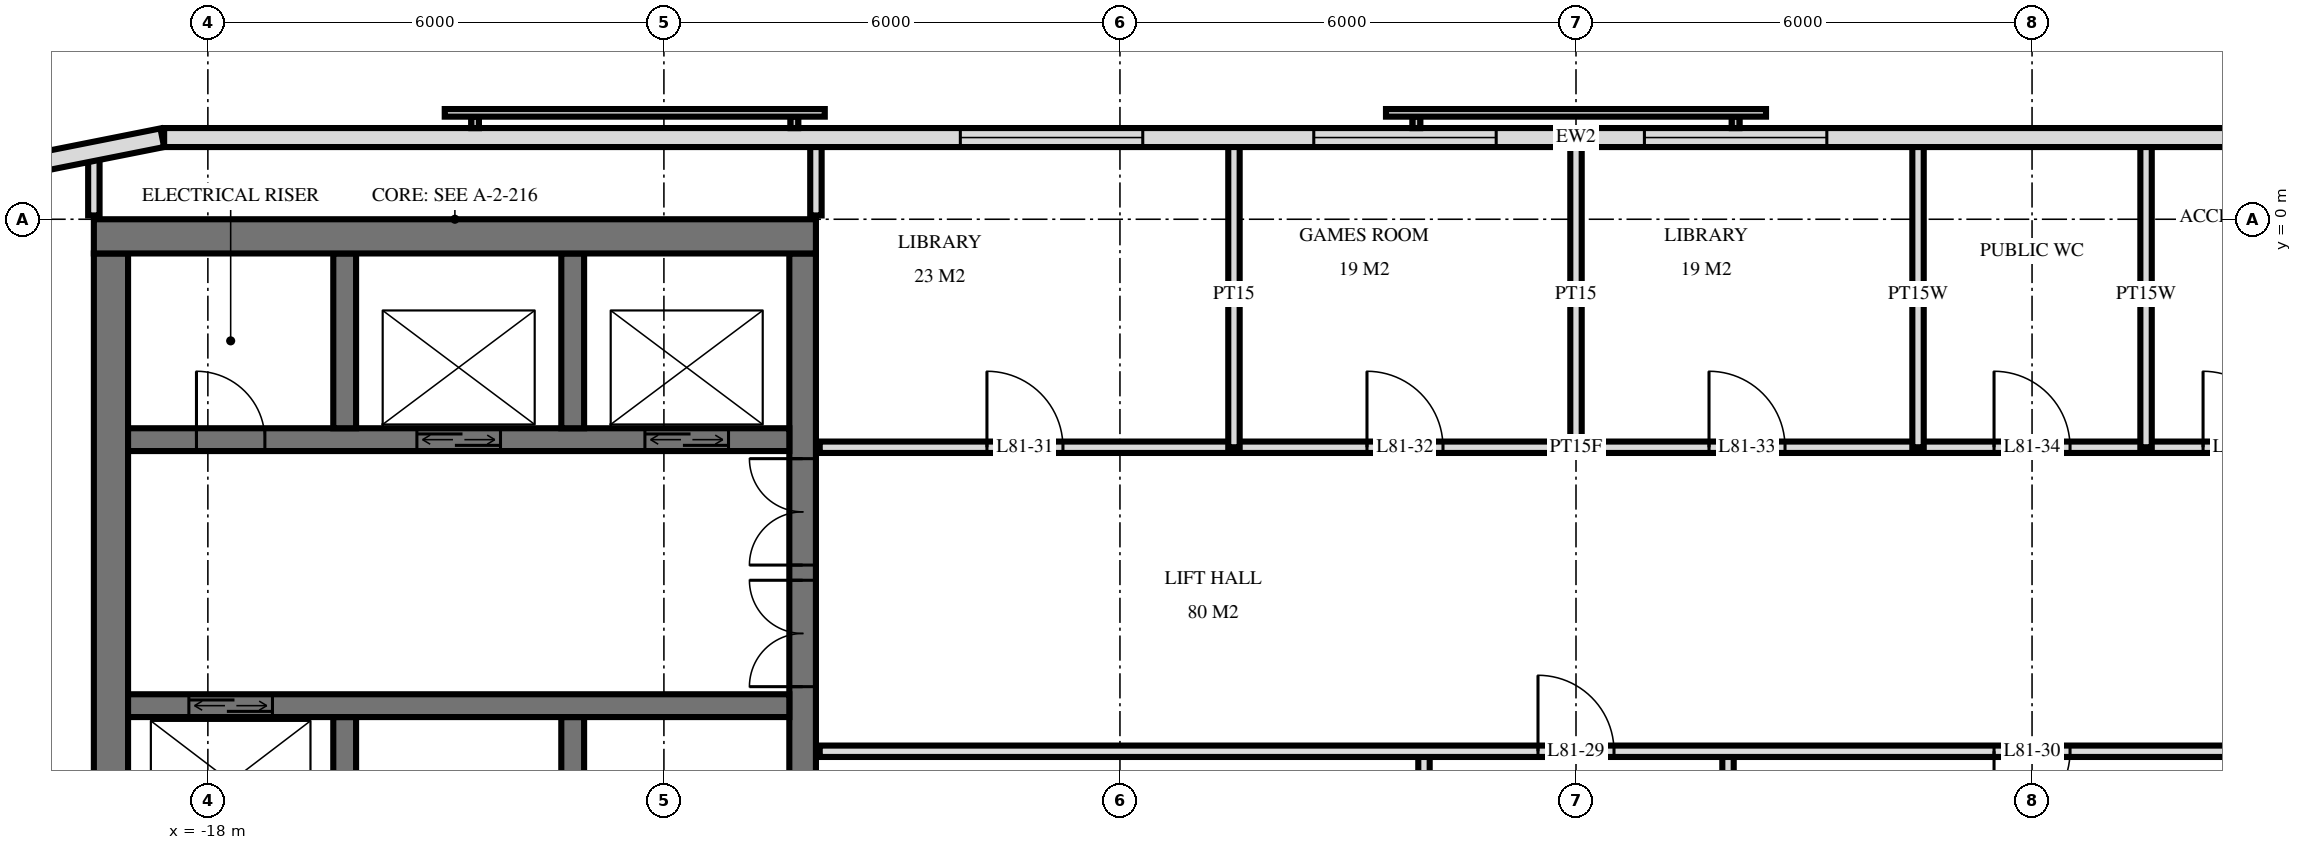
"""IFC4 building model, lengths in metres.
Left out: names, types, materials, properties, quantities, classifications, styles, units other than length and angle.
Written with IfcOpenShell. Run it as: python <this file> out.ifc"""

import sys

from ifc_helpers import new_model, si_unit, direction, frame, frame_2d, origin, place, context, subcontext, project, spatial, rectangle, extrude, element, fill, save


model = new_model("IFC4")
c1 = context("Model", 3, precision=1e-05, world=origin(), true_north=direction((0.0, 1.0)))
c2 = subcontext(c1, "Body", "Model", "MODEL_VIEW")
j1 = project(units=[si_unit("LENGTHUNIT", "METRE"), si_unit("PLANEANGLEUNIT", "RADIAN")], contexts=[c1])
p1 = place(None, origin())
s1 = spatial("IfcSite", under=j1, at=p1, CompositionType="ELEMENT")
p2 = place(p1, origin())
s2 = spatial("IfcBuilding", under=s1, at=p2, CompositionType="ELEMENT")
p3 = place(p2, frame((0.0, 0.0, 305.1)))
s3 = spatial("IfcBuildingStorey", under=s2, at=p3, CompositionType="ELEMENT", Elevation=305.1)
p4 = place(p3, frame((-19.5, -0.225, 0.0), z_axis=(0.0, 0.0, 1.0), x_axis=(1.0, 0.0, 0.0)))
e1 = element("IfcWall", 1, at=p4, inside=s3, PredefinedType="SHEAR", context=c2, shape_type="SweptSolid", body=[
    extrude(rectangle(XDim=9.5, YDim=0.45, at=frame_2d((4.75, 0.0))), origin(), (0.0, 0.0, 1.0), 3.5),
])
p5 = place(p3, frame((-10.175, -14.55, 0.0), z_axis=(0.0, 0.0, 1.0), x_axis=(0.0, 1.0, 0.0)))
e2 = element("IfcWall", 2, at=p5, inside=s3, PredefinedType="SHEAR", context=c2, shape_type="SweptSolid", body=[
    extrude(rectangle(XDim=14.1, YDim=0.35, at=frame_2d((7.05, 0.0))), origin(), (0.0, 0.0, 1.0), 3.5),
])
p6 = place(p5, frame((8.4, 0.0, 0.0)))
e3 = element("IfcOpeningElement", 3, at=p6, cuts=e2, PredefinedType="OPENING", context=c2, shape_type="SweptSolid", body=[
    extrude(rectangle(XDim=1.4, YDim=2.4, at=frame_2d((0.7, 1.2))), frame((0.0, 0.185, 0.0), z_axis=(0.0, -1.0, 0.0), x_axis=(1.0, 0.0, 0.0)), (0.0, 0.0, 1.0), 0.37),
])
p7 = place(p5, frame((10.0, 0.0, 0.0)))
e4 = element("IfcOpeningElement", 4, at=p7, cuts=e2, PredefinedType="OPENING", context=c2, shape_type="SweptSolid", body=[
    extrude(rectangle(XDim=1.4, YDim=2.4, at=frame_2d((0.7, 1.2))), frame((0.0, 0.185, 0.0), z_axis=(0.0, -1.0, 0.0), x_axis=(1.0, 0.0, 0.0)), (0.0, 0.0, 1.0), 0.37),
])
p8 = place(p5, frame((4.0, 0.0, 0.0)))
e5 = element("IfcOpeningElement", 5, at=p8, cuts=e2, PredefinedType="OPENING", context=c2, shape_type="SweptSolid", body=[
    extrude(rectangle(XDim=1.2, YDim=2.1, at=frame_2d((0.6, 1.05))), frame((0.0, 0.185, 0.0), z_axis=(0.0, -1.0, 0.0), x_axis=(1.0, 0.0, 0.0)), (0.0, 0.0, 1.0), 0.37),
])
p9 = place(p3, frame((-19.275, -14.55, 0.0), z_axis=(0.0, 0.0, 1.0), x_axis=(0.0, 1.0, 0.0)))
e6 = element("IfcWall", 6, at=p9, inside=s3, PredefinedType="SHEAR", context=c2, shape_type="SweptSolid", body=[
    extrude(rectangle(XDim=14.1, YDim=0.45, at=frame_2d((7.05, 0.0))), origin(), (0.0, 0.0, 1.0), 3.5),
])
p10 = place(p3, frame((-19.05, -2.9, 0.0), z_axis=(0.0, 0.0, 1.0), x_axis=(1.0, 0.0, 0.0)))
e7 = element("IfcWall", 7, at=p10, inside=s3, PredefinedType="SHEAR", context=c2, shape_type="SweptSolid", body=[
    extrude(rectangle(XDim=8.7, YDim=0.3, at=frame_2d((4.35, 0.0))), origin(), (0.0, 0.0, 1.0), 3.5),
])
p11 = place(p10, frame((6.8, 0.0, 0.0)))
e8 = element("IfcOpeningElement", 8, at=p11, cuts=e7, PredefinedType="OPENING", context=c2, shape_type="SweptSolid", body=[
    extrude(rectangle(XDim=1.1, YDim=2.1, at=frame_2d((0.55, 1.05))), frame((0.0, 0.16, 0.0), z_axis=(0.0, -1.0, 0.0), x_axis=(1.0, 0.0, 0.0)), (0.0, 0.0, 1.0), 0.32),
])
p12 = place(p10, frame((3.8, 0.0, 0.0)))
e9 = element("IfcOpeningElement", 9, at=p12, cuts=e7, PredefinedType="OPENING", context=c2, shape_type="SweptSolid", body=[
    extrude(rectangle(XDim=1.1, YDim=2.1, at=frame_2d((0.55, 1.05))), frame((0.0, 0.16, 0.0), z_axis=(0.0, -1.0, 0.0), x_axis=(1.0, 0.0, 0.0)), (0.0, 0.0, 1.0), 0.32),
])
p13 = place(p10, frame((0.9, 0.0, 0.0)))
e10 = element("IfcOpeningElement", 10, at=p13, cuts=e7, PredefinedType="OPENING", context=c2, shape_type="SweptSolid", body=[
    extrude(rectangle(XDim=0.9, YDim=2.1, at=frame_2d((0.45, 1.05))), frame((0.0, 0.16, 0.0), z_axis=(0.0, -1.0, 0.0), x_axis=(1.0, 0.0, 0.0)), (0.0, 0.0, 1.0), 0.32),
])
p14 = place(p3, frame((-19.05, -6.4, 0.0), z_axis=(0.0, 0.0, 1.0), x_axis=(1.0, 0.0, 0.0)))
e11 = element("IfcWall", 11, at=p14, inside=s3, PredefinedType="SHEAR", context=c2, shape_type="SweptSolid", body=[
    extrude(rectangle(XDim=8.7, YDim=0.3, at=frame_2d((4.35, 0.0))), origin(), (0.0, 0.0, 1.0), 3.5),
])
p15 = place(p14, frame((0.8, 0.0, 0.0)))
e12 = element("IfcOpeningElement", 12, at=p15, cuts=e11, PredefinedType="OPENING", context=c2, shape_type="SweptSolid", body=[
    extrude(rectangle(XDim=1.1, YDim=2.1, at=frame_2d((0.55, 1.05))), frame((0.0, 0.16, 0.0), z_axis=(0.0, -1.0, 0.0), x_axis=(1.0, 0.0, 0.0)), (0.0, 0.0, 1.0), 0.32),
])
for number, where, z_axis, x_axis in (
    (13, (-13.2, -2.75, 0.0), (0.0, 0.0, 1.0), (0.0, 1.0, 0.0)),
    (14, (-13.2, -8.85, 0.0), (0.0, 0.0, 1.0), (0.0, 1.0, 0.0)),
    (15, (-16.2, -2.75, 0.0), (0.0, 0.0, 1.0), (0.0, 1.0, 0.0)),
    (16, (-16.2, -8.85, 0.0), (0.0, 0.0, 1.0), (0.0, 1.0, 0.0)),
):
    element("IfcWall", number, at=place(p3, frame(where, z_axis=z_axis, x_axis=x_axis)), inside=s3, PredefinedType="SHEAR", context=c2, shape_type="SweptSolid", body=[
        extrude(rectangle(XDim=2.3, YDim=0.3, at=frame_2d((1.15, 0.0))), origin(), (0.0, 0.0, 1.0), 3.5),
    ])
p16 = place(p3, frame((18.575, 1.075, 0.0), z_axis=(0.0, 0.0, 1.0), x_axis=(-1.0, 0.0, 0.0)))
e17 = element("IfcWall", 17, at=p16, inside=s3, PredefinedType="SOLIDWALL", context=c2, shape_type="SweptSolid", body=[
    extrude(rectangle(XDim=37.151, YDim=0.25, at=frame_2d((18.575, 0.0))), origin(), (0.0, 0.0, 1.0), 3.2),
])
p17 = place(p16, frame((15.275, 0.0, 0.9)))
e18 = element("IfcOpeningElement", 18, at=p17, cuts=e17, PredefinedType="OPENING", context=c2, shape_type="SweptSolid", body=[
    extrude(rectangle(XDim=2.4, YDim=1.5, at=frame_2d((1.2, 0.75))), frame((0.0, 0.135, 0.0), z_axis=(0.0, -1.0, 0.0), x_axis=(1.0, 0.0, 0.0)), (0.0, 0.0, 1.0), 0.27),
])
p18 = place(p16, frame((19.625, 0.0, 0.9)))
e19 = element("IfcOpeningElement", 19, at=p18, cuts=e17, PredefinedType="OPENING", context=c2, shape_type="SweptSolid", body=[
    extrude(rectangle(XDim=2.4, YDim=1.5, at=frame_2d((1.2, 0.75))), frame((0.0, 0.135, 0.0), z_axis=(0.0, -1.0, 0.0), x_axis=(1.0, 0.0, 0.0)), (0.0, 0.0, 1.0), 0.27),
])
p19 = place(p16, frame((24.275, 0.0, 0.9)))
e20 = element("IfcOpeningElement", 20, at=p19, cuts=e17, PredefinedType="OPENING", context=c2, shape_type="SweptSolid", body=[
    extrude(rectangle(XDim=2.4, YDim=1.5, at=frame_2d((1.2, 0.75))), frame((0.0, 0.135, 0.0), z_axis=(0.0, -1.0, 0.0), x_axis=(1.0, 0.0, 0.0)), (0.0, 0.0, 1.0), 0.27),
])
p20 = place(p3, frame((-18.6, 1.073, 0.0), z_axis=(0.0, 0.0, 1.0), x_axis=(-0.980797896849, -0.195026884138, 0.0)))
e21 = element("IfcWall", 21, at=p20, inside=s3, PredefinedType="SOLIDWALL", context=c2, shape_type="SweptSolid", body=[
    extrude(rectangle(XDim=1.681, YDim=0.25, at=frame_2d((0.841, 0.0))), origin(), (0.0, 0.0, 1.0), 3.2),
])
for number, where, z_axis, x_axis in (
    (22, (7.5, -3.0, 0.0), (0.0, 0.0, 1.0), (0.0, 1.0, 0.0)),
    (23, (4.5, -3.0, 0.0), (0.0, 0.0, 1.0), (0.0, 1.0, 0.0)),
):
    element("IfcWall", number, at=place(p3, frame(where, z_axis=z_axis, x_axis=x_axis)), inside=s3, PredefinedType="PLUMBINGWALL", context=c2, shape_type="SweptSolid", body=[
        extrude(rectangle(XDim=4.02, YDim=0.15, at=frame_2d((2.01, 0.0))), origin(), (0.0, 0.0, 1.0), 3.22),
    ])
p21 = place(p3, frame((2.0, -11.0, 0.0), z_axis=(0.0, 0.0, 1.0), x_axis=(0.0, 1.0, 0.0)))
e24 = element("IfcWall", 24, at=p21, inside=s3, PredefinedType="PARTITIONING", context=c2, shape_type="SweptSolid", body=[
    extrude(rectangle(XDim=4.0, YDim=0.15, at=frame_2d((2.0, 0.0))), origin(), (0.0, 0.0, 1.0), 3.22),
])
p22 = place(p3, frame((0.0, -3.0, 0.0), z_axis=(0.0, 0.0, 1.0), x_axis=(0.0, 1.0, 0.0)))
e25 = element("IfcWall", 25, at=p22, inside=s3, PredefinedType="PARTITIONING", context=c2, shape_type="SweptSolid", body=[
    extrude(rectangle(XDim=4.02, YDim=0.15, at=frame_2d((2.01, 0.0))), origin(), (0.0, 0.0, 1.0), 3.22),
])
p23 = place(p3, frame((-2.0, -11.0, 0.0), z_axis=(0.0, 0.0, 1.0), x_axis=(0.0, 1.0, 0.0)))
e26 = element("IfcWall", 26, at=p23, inside=s3, PredefinedType="PARTITIONING", context=c2, shape_type="SweptSolid", body=[
    extrude(rectangle(XDim=4.0, YDim=0.15, at=frame_2d((2.0, 0.0))), origin(), (0.0, 0.0, 1.0), 3.22),
])
p24 = place(p3, frame((-4.5, -3.0, 0.0), z_axis=(0.0, 0.0, 1.0), x_axis=(0.0, 1.0, 0.0)))
e27 = element("IfcWall", 27, at=p24, inside=s3, PredefinedType="PARTITIONING", context=c2, shape_type="SweptSolid", body=[
    extrude(rectangle(XDim=4.02, YDim=0.15, at=frame_2d((2.01, 0.0))), origin(), (0.0, 0.0, 1.0), 3.22),
])
p25 = place(p3, frame((-10.0, 0.05, 0.0), z_axis=(0.0, 0.0, 1.0), x_axis=(0.0, 1.0, 0.0)))
e28 = element("IfcWall", 28, at=p25, inside=s3, PredefinedType="PARTITIONING", context=c2, shape_type="SweptSolid", body=[
    extrude(rectangle(XDim=0.97, YDim=0.15, at=frame_2d((0.485, 0.0))), origin(), (0.0, 0.0, 1.0), 3.22),
])
p26 = place(p3, frame((-19.5, 0.05, 0.0), z_axis=(0.0, 0.0, 1.0), x_axis=(0.0, 1.0, 0.0)))
e29 = element("IfcWall", 29, at=p26, inside=s3, PredefinedType="PARTITIONING", context=c2, shape_type="SweptSolid", body=[
    extrude(rectangle(XDim=0.787, YDim=0.15, at=frame_2d((0.394, 0.0))), origin(), (0.0, 0.0, 1.0), 3.22),
])
p27 = place(p3, frame((-9.95, -7.0, 0.0), z_axis=(0.0, 0.0, 1.0), x_axis=(1.0, 0.0, 0.0)))
e30 = element("IfcWall", 30, at=p27, inside=s3, PredefinedType="PARTITIONING", context=c2, shape_type="SweptSolid", body=[
    extrude(rectangle(XDim=19.9, YDim=0.15, at=frame_2d((9.95, 0.0))), origin(), (0.0, 0.0, 1.0), 3.22),
])
p28 = place(p27, frame((9.45, 0.0, 0.0)))
e31 = element("IfcOpeningElement", 31, at=p28, cuts=e30, PredefinedType="OPENING", context=c2, shape_type="SweptSolid", body=[
    extrude(rectangle(XDim=1.0, YDim=2.1, at=frame_2d((0.5, 1.05))), frame((0.0, 0.085, 0.0), z_axis=(0.0, -1.0, 0.0), x_axis=(1.0, 0.0, 0.0)), (0.0, 0.0, 1.0), 0.17),
])
p29 = place(p27, frame((15.45, 0.0, 0.0)))
e32 = element("IfcOpeningElement", 32, at=p29, cuts=e30, PredefinedType="OPENING", context=c2, shape_type="SweptSolid", body=[
    extrude(rectangle(XDim=1.0, YDim=2.1, at=frame_2d((0.5, 1.05))), frame((0.0, 0.085, 0.0), z_axis=(0.0, -1.0, 0.0), x_axis=(1.0, 0.0, 0.0)), (0.0, 0.0, 1.0), 0.17),
])
p30 = place(p3, frame((-9.95, -3.0, 0.0), z_axis=(0.0, 0.0, 1.0), x_axis=(1.0, 0.0, 0.0)))
e33 = element("IfcWall", 33, at=p30, inside=s3, PredefinedType="PARTITIONING", context=c2, shape_type="SweptSolid", body=[
    extrude(rectangle(XDim=19.9, YDim=0.15, at=frame_2d((9.95, 0.0))), origin(), (0.0, 0.0, 1.0), 3.22),
])
p31 = place(p30, frame((2.2, 0.0, 0.0)))
e34 = element("IfcOpeningElement", 34, at=p31, cuts=e33, PredefinedType="OPENING", context=c2, shape_type="SweptSolid", body=[
    extrude(rectangle(XDim=1.0, YDim=2.1, at=frame_2d((0.5, 1.05))), frame((0.0, 0.085, 0.0), z_axis=(0.0, -1.0, 0.0), x_axis=(1.0, 0.0, 0.0)), (0.0, 0.0, 1.0), 0.17),
])
p32 = place(p30, frame((7.2, 0.0, 0.0)))
e35 = element("IfcOpeningElement", 35, at=p32, cuts=e33, PredefinedType="OPENING", context=c2, shape_type="SweptSolid", body=[
    extrude(rectangle(XDim=1.0, YDim=2.1, at=frame_2d((0.5, 1.05))), frame((0.0, 0.085, 0.0), z_axis=(0.0, -1.0, 0.0), x_axis=(1.0, 0.0, 0.0)), (0.0, 0.0, 1.0), 0.17),
])
p33 = place(p30, frame((11.7, 0.0, 0.0)))
e36 = element("IfcOpeningElement", 36, at=p33, cuts=e33, PredefinedType="OPENING", context=c2, shape_type="SweptSolid", body=[
    extrude(rectangle(XDim=1.0, YDim=2.1, at=frame_2d((0.5, 1.05))), frame((0.0, 0.085, 0.0), z_axis=(0.0, -1.0, 0.0), x_axis=(1.0, 0.0, 0.0)), (0.0, 0.0, 1.0), 0.17),
])
p34 = place(p30, frame((15.45, 0.0, 0.0)))
e37 = element("IfcOpeningElement", 37, at=p34, cuts=e33, PredefinedType="OPENING", context=c2, shape_type="SweptSolid", body=[
    extrude(rectangle(XDim=1.0, YDim=2.1, at=frame_2d((0.5, 1.05))), frame((0.0, 0.085, 0.0), z_axis=(0.0, -1.0, 0.0), x_axis=(1.0, 0.0, 0.0)), (0.0, 0.0, 1.0), 0.17),
])
p35 = place(p30, frame((18.2, 0.0, 0.0)))
e38 = element("IfcOpeningElement", 38, at=p35, cuts=e33, PredefinedType="OPENING", context=c2, shape_type="SweptSolid", body=[
    extrude(rectangle(XDim=1.0, YDim=2.1, at=frame_2d((0.5, 1.05))), frame((0.0, 0.085, 0.0), z_axis=(0.0, -1.0, 0.0), x_axis=(1.0, 0.0, 0.0)), (0.0, 0.0, 1.0), 0.17),
])
p36 = place(p17, origin())
e39 = element("IfcWindow", 39, at=p36, inside=s3, PartitioningType="SINGLE_PANEL", PredefinedType="WINDOW", context=c2, shape_type="SweptSolid", body=[
    extrude(rectangle(XDim=2.4, YDim=1.5, at=frame_2d((1.2, 0.75))), frame((0.0, 0.03, 0.0), z_axis=(0.0, -1.0, 0.0), x_axis=(1.0, 0.0, 0.0)), (0.0, 0.0, 1.0), 0.06),
])
fill(e18, e39)
p37 = place(p18, origin())
e40 = element("IfcWindow", 40, at=p37, inside=s3, PartitioningType="SINGLE_PANEL", PredefinedType="WINDOW", context=c2, shape_type="SweptSolid", body=[
    extrude(rectangle(XDim=2.4, YDim=1.5, at=frame_2d((1.2, 0.75))), frame((0.0, 0.03, 0.0), z_axis=(0.0, -1.0, 0.0), x_axis=(1.0, 0.0, 0.0)), (0.0, 0.0, 1.0), 0.06),
])
fill(e19, e40)
p38 = place(p19, origin())
e41 = element("IfcWindow", 41, at=p38, inside=s3, PartitioningType="SINGLE_PANEL", PredefinedType="WINDOW", context=c2, shape_type="SweptSolid", body=[
    extrude(rectangle(XDim=2.4, YDim=1.5, at=frame_2d((1.2, 0.75))), frame((0.0, 0.03, 0.0), z_axis=(0.0, -1.0, 0.0), x_axis=(1.0, 0.0, 0.0)), (0.0, 0.0, 1.0), 0.06),
])
fill(e20, e41)
p39 = place(p11, origin())
e42 = element("IfcDoor", 42, at=p39, inside=s3, OperationType="DOUBLE_DOOR_SLIDING", PredefinedType="USERDEFINED", context=c2, shape_type="SweptSolid", body=[
    extrude(rectangle(XDim=1.1, YDim=2.1, at=frame_2d((0.55, 1.05))), frame((0.0, 0.025, 0.0), z_axis=(0.0, -1.0, 0.0), x_axis=(1.0, 0.0, 0.0)), (0.0, 0.0, 1.0), 0.05),
])
fill(e8, e42)
p40 = place(p12, origin())
e43 = element("IfcDoor", 43, at=p40, inside=s3, OperationType="DOUBLE_DOOR_SLIDING", PredefinedType="USERDEFINED", context=c2, shape_type="SweptSolid", body=[
    extrude(rectangle(XDim=1.1, YDim=2.1, at=frame_2d((0.55, 1.05))), frame((0.0, 0.025, 0.0), z_axis=(0.0, -1.0, 0.0), x_axis=(1.0, 0.0, 0.0)), (0.0, 0.0, 1.0), 0.05),
])
fill(e9, e43)
p41 = place(p15, origin())
e44 = element("IfcDoor", 44, at=p41, inside=s3, OperationType="DOUBLE_DOOR_SLIDING", PredefinedType="USERDEFINED", context=c2, shape_type="SweptSolid", body=[
    extrude(rectangle(XDim=1.1, YDim=2.1, at=frame_2d((0.55, 1.05))), frame((0.0, 0.025, 0.0), z_axis=(0.0, -1.0, 0.0), x_axis=(1.0, 0.0, 0.0)), (0.0, 0.0, 1.0), 0.05),
])
fill(e12, e44)
p42 = place(p6, origin())
e45 = element("IfcDoor", 45, at=p42, inside=s3, OperationType="DOUBLE_DOOR_SINGLE_SWING", PredefinedType="DOOR", context=c2, shape_type="SweptSolid", body=[
    extrude(rectangle(XDim=1.4, YDim=2.4, at=frame_2d((0.7, 1.2))), frame((0.0, 0.025, 0.0), z_axis=(0.0, -1.0, 0.0), x_axis=(1.0, 0.0, 0.0)), (0.0, 0.0, 1.0), 0.05),
])
fill(e3, e45)
p43 = place(p7, origin())
e46 = element("IfcDoor", 46, at=p43, inside=s3, OperationType="DOUBLE_DOOR_SINGLE_SWING", PredefinedType="DOOR", context=c2, shape_type="SweptSolid", body=[
    extrude(rectangle(XDim=1.4, YDim=2.4, at=frame_2d((0.7, 1.2))), frame((0.0, 0.025, 0.0), z_axis=(0.0, -1.0, 0.0), x_axis=(1.0, 0.0, 0.0)), (0.0, 0.0, 1.0), 0.05),
])
fill(e4, e46)
p44 = place(p13, origin())
e47 = element("IfcDoor", 47, at=p44, inside=s3, OperationType="SINGLE_SWING_RIGHT", PredefinedType="DOOR", context=c2, shape_type="SweptSolid", body=[
    extrude(rectangle(XDim=0.9, YDim=2.1, at=frame_2d((0.45, 1.05))), frame((0.0, 0.025, 0.0), z_axis=(0.0, -1.0, 0.0), x_axis=(1.0, 0.0, 0.0)), (0.0, 0.0, 1.0), 0.05),
])
fill(e10, e47)
p45 = place(p28, origin())
e48 = element("IfcDoor", 48, at=p45, inside=s3, OperationType="SINGLE_SWING_RIGHT", PredefinedType="DOOR", context=c2, shape_type="SweptSolid", body=[
    extrude(rectangle(XDim=1.0, YDim=2.1, at=frame_2d((0.5, 1.05))), frame((0.0, 0.025, 0.0), z_axis=(0.0, -1.0, 0.0), x_axis=(1.0, 0.0, 0.0)), (0.0, 0.0, 1.0), 0.05),
])
fill(e31, e48)
p46 = place(p29, frame((0.5, 0.0, 0.0), z_axis=(0.0, 0.0, 1.0), x_axis=(-1.0, 0.0, 0.0)))
e49 = element("IfcDoor", 49, at=p46, inside=s3, OperationType="SINGLE_SWING_LEFT", PredefinedType="DOOR", context=c2, shape_type="SweptSolid", body=[
    extrude(rectangle(XDim=1.0, YDim=2.1, at=frame_2d((0.0, 1.05))), frame((0.0, -0.025, 0.0), z_axis=(0.0, 1.0, 0.0), x_axis=(-1.0, 0.0, 0.0)), (0.0, 0.0, 1.0), 0.05),
])
fill(e32, e49)
p47 = place(p31, origin())
e50 = element("IfcDoor", 50, at=p47, inside=s3, OperationType="SINGLE_SWING_RIGHT", PredefinedType="DOOR", context=c2, shape_type="SweptSolid", body=[
    extrude(rectangle(XDim=1.0, YDim=2.1, at=frame_2d((0.5, 1.05))), frame((0.0, 0.025, 0.0), z_axis=(0.0, -1.0, 0.0), x_axis=(1.0, 0.0, 0.0)), (0.0, 0.0, 1.0), 0.05),
])
fill(e34, e50)
p48 = place(p32, origin())
e51 = element("IfcDoor", 51, at=p48, inside=s3, OperationType="SINGLE_SWING_RIGHT", PredefinedType="DOOR", context=c2, shape_type="SweptSolid", body=[
    extrude(rectangle(XDim=1.0, YDim=2.1, at=frame_2d((0.5, 1.05))), frame((0.0, 0.025, 0.0), z_axis=(0.0, -1.0, 0.0), x_axis=(1.0, 0.0, 0.0)), (0.0, 0.0, 1.0), 0.05),
])
fill(e35, e51)
p49 = place(p33, origin())
e52 = element("IfcDoor", 52, at=p49, inside=s3, OperationType="SINGLE_SWING_RIGHT", PredefinedType="DOOR", context=c2, shape_type="SweptSolid", body=[
    extrude(rectangle(XDim=1.0, YDim=2.1, at=frame_2d((0.5, 1.05))), frame((0.0, 0.025, 0.0), z_axis=(0.0, -1.0, 0.0), x_axis=(1.0, 0.0, 0.0)), (0.0, 0.0, 1.0), 0.05),
])
fill(e36, e52)
p50 = place(p34, origin())
e53 = element("IfcDoor", 53, at=p50, inside=s3, OperationType="SINGLE_SWING_RIGHT", PredefinedType="DOOR", context=c2, shape_type="SweptSolid", body=[
    extrude(rectangle(XDim=1.0, YDim=2.1, at=frame_2d((0.5, 1.05))), frame((0.0, 0.025, 0.0), z_axis=(0.0, -1.0, 0.0), x_axis=(1.0, 0.0, 0.0)), (0.0, 0.0, 1.0), 0.05),
])
fill(e37, e53)
p51 = place(p35, origin())
e54 = element("IfcDoor", 54, at=p51, inside=s3, OperationType="SINGLE_SWING_RIGHT", PredefinedType="DOOR", context=c2, shape_type="SweptSolid", body=[
    extrude(rectangle(XDim=1.0, YDim=2.1, at=frame_2d((0.5, 1.05))), frame((0.0, 0.025, 0.0), z_axis=(0.0, -1.0, 0.0), x_axis=(1.0, 0.0, 0.0)), (0.0, 0.0, 1.0), 0.05),
])
fill(e38, e54)
save(model, sys.argv[1])
